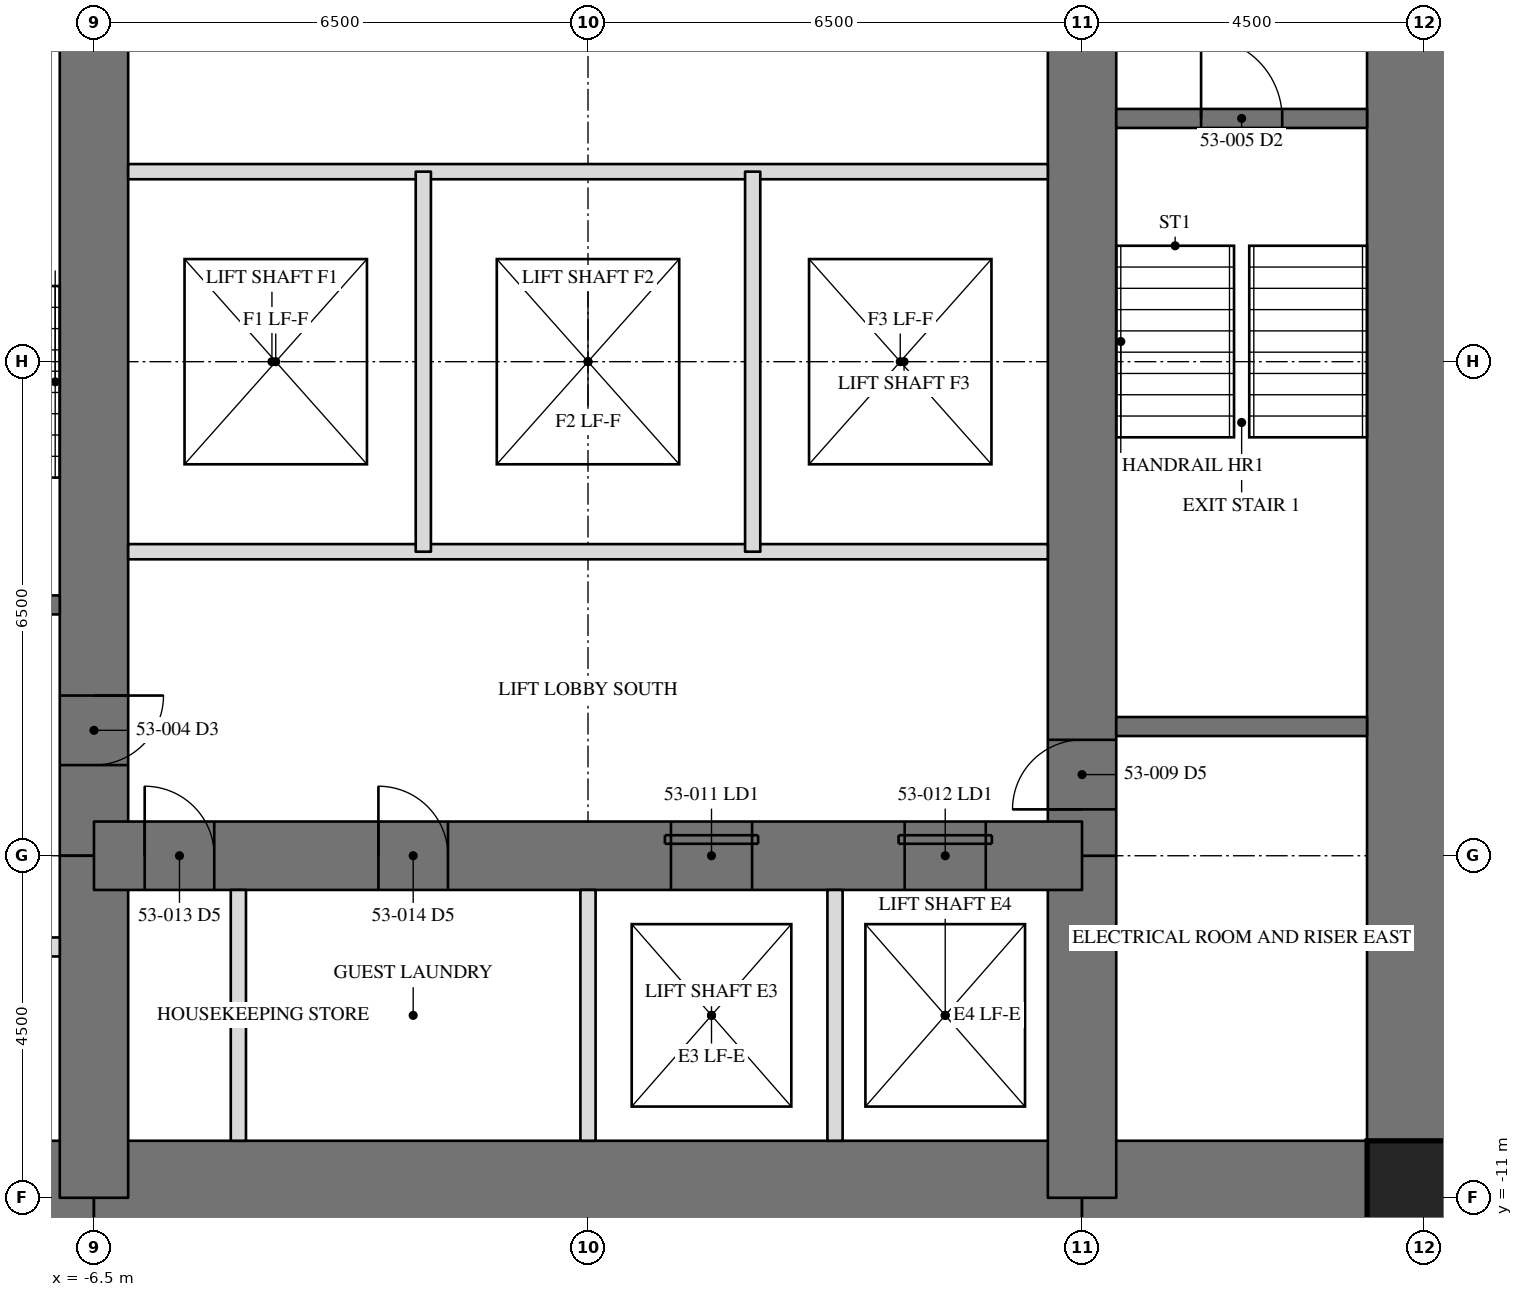
"""IFC4 building model, lengths in metres.
Left out: names, types, materials, properties, quantities, classifications, styles, units other than length and angle.
Written with IfcOpenShell. Run it as: python <this file> out.ifc"""

import sys

from ifc_helpers import new_model, si_unit, direction, frame, frame_2d, origin, origin_2d, place, context, subcontext, project, spatial, rectangle, hollow_rectangle, extrude, element, fill, save


model = new_model("IFC4")
c1 = context("Model", 3, precision=1e-05, world=origin(), true_north=direction((0.0, 1.0)))
c2 = subcontext(c1, "Body", "Model", "MODEL_VIEW")
j1 = project(units=[si_unit("LENGTHUNIT", "METRE"), si_unit("PLANEANGLEUNIT", "RADIAN")], contexts=[c1])
p1 = place(None, origin())
s1 = spatial("IfcSite", under=j1, at=p1, CompositionType="ELEMENT")
p2 = place(p1, origin())
s2 = spatial("IfcBuilding", under=s1, at=p2, CompositionType="ELEMENT")
p3 = place(p2, frame((0.0, 0.0, 222.2)))
s3 = spatial("IfcBuildingStorey", under=s2, at=p3, CompositionType="ELEMENT", Elevation=222.2)
p4 = place(p3, frame((11.0, -11.0, 0.0), z_axis=(0.0, 0.0, 1.0), x_axis=(0.0, 1.0, 0.0)))
e1 = element("IfcWall", 1, at=p4, inside=s3, PredefinedType="SHEAR", context=c2, shape_type="SweptSolid", body=[
    extrude(rectangle(XDim=22.0, YDim=1.5, at=frame_2d((11.0, 0.0))), origin(), (0.0, 0.0, 1.0), 3.5),
])
p5 = place(p4, frame((15.393, 0.0, 0.0)))
e2 = element("IfcOpeningElement", 2, at=p5, cuts=e1, PredefinedType="OPENING", context=c2, shape_type="SweptSolid", body=[
    extrude(rectangle(XDim=0.915, YDim=2.134, at=frame_2d((0.458, 1.067))), frame((0.0, 0.76, 0.0), z_axis=(0.0, -1.0, 0.0), x_axis=(1.0, 0.0, 0.0)), (0.0, 0.0, 1.0), 1.52),
])
p6 = place(p3, frame((-11.0, -11.0, 0.0), z_axis=(0.0, 0.0, 1.0), x_axis=(1.0, 0.0, 0.0)))
e3 = element("IfcWall", 3, at=p6, inside=s3, PredefinedType="SHEAR", context=c2, shape_type="SweptSolid", body=[
    extrude(rectangle(XDim=4.5, YDim=1.5, at=frame_2d((2.25, 0.0))), origin(), (0.0, 0.0, 1.0), 3.5),
])
p7 = place(p3, frame((-6.5, -11.0, 0.0), z_axis=(0.0, 0.0, 1.0), x_axis=(1.0, 0.0, 0.0)))
e4 = element("IfcWall", 4, at=p7, inside=s3, PredefinedType="SHEAR", context=c2, shape_type="SweptSolid", body=[
    extrude(rectangle(XDim=13.0, YDim=1.5, at=frame_2d((6.5, 0.0))), origin(), (0.0, 0.0, 1.0), 3.5),
])
p8 = place(p3, frame((6.5, -11.0, 0.0), z_axis=(0.0, 0.0, 1.0), x_axis=(1.0, 0.0, 0.0)))
e5 = element("IfcWall", 5, at=p8, inside=s3, PredefinedType="SHEAR", context=c2, shape_type="SweptSolid", body=[
    extrude(rectangle(XDim=4.5, YDim=1.5, at=frame_2d((2.25, 0.0))), origin(), (0.0, 0.0, 1.0), 3.5),
])
p9 = place(p3, frame((6.5, -11.0, 0.0), z_axis=(0.0, 0.0, 1.0), x_axis=(0.0, 1.0, 0.0)))
e6 = element("IfcWall", 6, at=p9, inside=s3, PredefinedType="SHEAR", context=c2, shape_type="SweptSolid", body=[
    extrude(rectangle(XDim=4.5, YDim=0.9, at=frame_2d((2.25, 0.0))), origin(), (0.0, 0.0, 1.0), 3.5),
])
p10 = place(p3, frame((6.5, -6.5, 0.0), z_axis=(0.0, 0.0, 1.0), x_axis=(0.0, 1.0, 0.0)))
e7 = element("IfcWall", 7, at=p10, inside=s3, PredefinedType="SHEAR", context=c2, shape_type="SweptSolid", body=[
    extrude(rectangle(XDim=13.0, YDim=0.9, at=frame_2d((6.5, 0.0))), origin(), (0.0, 0.0, 1.0), 3.5),
])
p11 = place(p10, frame((10.893, 0.0, 0.0)))
e8 = element("IfcOpeningElement", 8, at=p11, cuts=e7, PredefinedType="OPENING", context=c2, shape_type="SweptSolid", body=[
    extrude(rectangle(XDim=0.915, YDim=2.134, at=frame_2d((0.458, 1.067))), frame((0.0, 0.46, 0.0), z_axis=(0.0, -1.0, 0.0), x_axis=(1.0, 0.0, 0.0)), (0.0, 0.0, 1.0), 0.92),
])
p12 = place(p10, frame((0.61, 0.0, 0.0)))
e9 = element("IfcOpeningElement", 9, at=p12, cuts=e7, PredefinedType="OPENING", context=c2, shape_type="SweptSolid", body=[
    extrude(rectangle(XDim=0.915, YDim=2.134, at=frame_2d((0.458, 1.067))), frame((0.0, 0.46, 0.0), z_axis=(0.0, -1.0, 0.0), x_axis=(1.0, 0.0, 0.0)), (0.0, 0.0, 1.0), 0.92),
])
p13 = place(p3, frame((-6.5, 6.5, 0.0), z_axis=(0.0, 0.0, 1.0), x_axis=(0.0, -1.0, 0.0)))
e10 = element("IfcWall", 10, at=p13, inside=s3, PredefinedType="SHEAR", context=c2, shape_type="SweptSolid", body=[
    extrude(rectangle(XDim=13.0, YDim=0.9, at=frame_2d((6.5, 0.0))), origin(), (0.0, 0.0, 1.0), 3.5),
])
p14 = place(p13, frame((10.893, 0.0, 0.0)))
e11 = element("IfcOpeningElement", 11, at=p14, cuts=e10, PredefinedType="OPENING", context=c2, shape_type="SweptSolid", body=[
    extrude(rectangle(XDim=0.915, YDim=2.134, at=frame_2d((0.458, 1.067))), frame((0.0, 0.46, 0.0), z_axis=(0.0, -1.0, 0.0), x_axis=(1.0, 0.0, 0.0)), (0.0, 0.0, 1.0), 0.92),
])
p15 = place(p13, frame((0.61, 0.0, 0.0)))
e12 = element("IfcOpeningElement", 12, at=p15, cuts=e10, PredefinedType="OPENING", context=c2, shape_type="SweptSolid", body=[
    extrude(rectangle(XDim=0.915, YDim=2.134, at=frame_2d((0.458, 1.067))), frame((0.0, 0.46, 0.0), z_axis=(0.0, -1.0, 0.0), x_axis=(1.0, 0.0, 0.0)), (0.0, 0.0, 1.0), 0.92),
])
p16 = place(p3, frame((-6.5, -6.5, 0.0), z_axis=(0.0, 0.0, 1.0), x_axis=(0.0, -1.0, 0.0)))
e13 = element("IfcWall", 13, at=p16, inside=s3, PredefinedType="SHEAR", context=c2, shape_type="SweptSolid", body=[
    extrude(rectangle(XDim=4.5, YDim=0.9, at=frame_2d((2.25, 0.0))), origin(), (0.0, 0.0, 1.0), 3.5),
])
p17 = place(p3, frame((-6.5, -6.5, 0.0), z_axis=(0.0, 0.0, 1.0), x_axis=(1.0, 0.0, 0.0)))
e14 = element("IfcWall", 14, at=p17, inside=s3, PredefinedType="SHEAR", context=c2, shape_type="SweptSolid", body=[
    extrude(rectangle(XDim=13.0, YDim=0.9, at=frame_2d((6.5, 0.0))), origin(), (0.0, 0.0, 1.0), 3.5),
])
p18 = place(p17, frame((7.592, 0.0, 0.0)))
e15 = element("IfcOpeningElement", 15, at=p18, cuts=e14, PredefinedType="OPENING", context=c2, shape_type="SweptSolid", body=[
    extrude(rectangle(XDim=1.067, YDim=2.134, at=frame_2d((0.533, 1.067))), frame((0.0, 0.46, 0.0), z_axis=(0.0, -1.0, 0.0), x_axis=(1.0, 0.0, 0.0)), (0.0, 0.0, 1.0), 0.92),
])
p19 = place(p17, frame((10.667, 0.0, 0.0)))
e16 = element("IfcOpeningElement", 16, at=p19, cuts=e14, PredefinedType="OPENING", context=c2, shape_type="SweptSolid", body=[
    extrude(rectangle(XDim=1.067, YDim=2.134, at=frame_2d((0.533, 1.067))), frame((0.0, 0.46, 0.0), z_axis=(0.0, -1.0, 0.0), x_axis=(1.0, 0.0, 0.0)), (0.0, 0.0, 1.0), 0.92),
])
p20 = place(p17, frame((0.667, 0.0, 0.0)))
e17 = element("IfcOpeningElement", 17, at=p20, cuts=e14, PredefinedType="OPENING", context=c2, shape_type="SweptSolid", body=[
    extrude(rectangle(XDim=0.915, YDim=2.134, at=frame_2d((0.458, 1.067))), frame((0.0, 0.46, 0.0), z_axis=(0.0, -1.0, 0.0), x_axis=(1.0, 0.0, 0.0)), (0.0, 0.0, 1.0), 0.92),
])
p21 = place(p17, frame((3.742, 0.0, 0.0)))
e18 = element("IfcOpeningElement", 18, at=p21, cuts=e14, PredefinedType="OPENING", context=c2, shape_type="SweptSolid", body=[
    extrude(rectangle(XDim=0.915, YDim=2.134, at=frame_2d((0.458, 1.067))), frame((0.0, 0.46, 0.0), z_axis=(0.0, -1.0, 0.0), x_axis=(1.0, 0.0, 0.0)), (0.0, 0.0, 1.0), 0.92),
])
p22 = place(p3, frame((11.0, -11.0, 0.0), z_axis=(0.0, 0.0, 1.0), x_axis=(1.0, 0.0, 0.0)))
e19 = element("IfcColumn", 19, at=p22, inside=s3, PredefinedType="COLUMN", context=c2, shape_type="SweptSolid", body=[
    extrude(hollow_rectangle(XDim=1.499, YDim=1.499, WallThickness=0.102, at=origin_2d()), origin(), (0.0, 0.0, 1.0), 3.5),
])
p23 = place(p3, frame((6.95, -4.8, 0.0), z_axis=(0.0, 0.0, 1.0), x_axis=(1.0, 0.0, 0.0)))
e20 = element("IfcWall", 20, at=p23, inside=s3, PredefinedType="SOLIDWALL", context=c2, shape_type="SweptSolid", body=[
    extrude(rectangle(XDim=3.3, YDim=0.25, at=frame_2d((1.65, 0.0))), origin(), (0.0, 0.0, 1.0), 3.31),
])
p24 = place(p3, frame((6.95, 3.2, 0.0), z_axis=(0.0, 0.0, 1.0), x_axis=(1.0, 0.0, 0.0)))
e21 = element("IfcWall", 21, at=p24, inside=s3, PredefinedType="SOLIDWALL", context=c2, shape_type="SweptSolid", body=[
    extrude(rectangle(XDim=3.3, YDim=0.25, at=frame_2d((1.65, 0.0))), origin(), (0.0, 0.0, 1.0), 3.31),
])
p25 = place(p24, frame((1.116, 0.0, 0.0)))
e22 = element("IfcOpeningElement", 22, at=p25, cuts=e21, PredefinedType="OPENING", context=c2, shape_type="SweptSolid", body=[
    extrude(rectangle(XDim=1.067, YDim=2.134, at=frame_2d((0.533, 1.067))), frame((0.0, 0.135, 0.0), z_axis=(0.0, -1.0, 0.0), x_axis=(1.0, 0.0, 0.0)), (0.0, 0.0, 1.0), 0.27),
])
p26 = place(p3, frame((-6.95, -3.2, 0.0), z_axis=(0.0, 0.0, 1.0), x_axis=(-1.0, 0.0, 0.0)))
e23 = element("IfcWall", 23, at=p26, inside=s3, PredefinedType="SOLIDWALL", context=c2, shape_type="SweptSolid", body=[
    extrude(rectangle(XDim=3.3, YDim=0.25, at=frame_2d((1.65, 0.0))), origin(), (0.0, 0.0, 1.0), 3.31),
])
p27 = place(p26, frame((1.116, 0.0, 0.0)))
e24 = element("IfcOpeningElement", 24, at=p27, cuts=e23, PredefinedType="OPENING", context=c2, shape_type="SweptSolid", body=[
    extrude(rectangle(XDim=1.067, YDim=2.134, at=frame_2d((0.533, 1.067))), frame((0.0, 0.135, 0.0), z_axis=(0.0, -1.0, 0.0), x_axis=(1.0, 0.0, 0.0)), (0.0, 0.0, 1.0), 0.27),
])
p28 = place(p3, frame((-6.95, -7.7, 0.0), z_axis=(0.0, 0.0, 1.0), x_axis=(-1.0, 0.0, 0.0)))
e25 = element("IfcWall", 25, at=p28, inside=s3, PredefinedType="PARTITIONING", context=c2, shape_type="SweptSolid", body=[
    extrude(rectangle(XDim=3.3, YDim=0.25, at=frame_2d((1.65, 0.0))), origin(), (0.0, 0.0, 1.0), 3.31),
])
p29 = place(p28, frame((0.45, 0.0, 0.0)))
e26 = element("IfcOpeningElement", 26, at=p29, cuts=e25, PredefinedType="OPENING", context=c2, shape_type="SweptSolid", body=[
    extrude(rectangle(XDim=1.219, YDim=2.134, at=frame_2d((0.609, 1.067))), frame((0.0, 0.135, 0.0), z_axis=(0.0, -1.0, 0.0), x_axis=(1.0, 0.0, 0.0)), (0.0, 0.0, 1.0), 0.27),
])
for number, where, z_axis, x_axis in (
    (27, (-6.05, 2.5, 0.0), (0.0, 0.0, 1.0), (1.0, 0.0, 0.0)),
    (28, (6.05, -2.5, 0.0), (0.0, 0.0, 1.0), (-1.0, 0.0, 0.0)),
):
    element("IfcWall", number, at=place(p3, frame(where, z_axis=z_axis, x_axis=x_axis)), inside=s3, PredefinedType="PARTITIONING", context=c2, shape_type="SweptSolid", body=[
        extrude(rectangle(XDim=12.1, YDim=0.2, at=frame_2d((6.05, 0.0))), origin(), (0.0, 0.0, 1.0), 3.31),
    ])
for number, where, z_axis, x_axis in (
    (29, (0.0, -10.25, 0.0), (0.0, 0.0, 1.0), (0.0, 1.0, 0.0)),
    (30, (3.25, -10.25, 0.0), (0.0, 0.0, 1.0), (0.0, 1.0, 0.0)),
):
    element("IfcWall", number, at=place(p3, frame(where, z_axis=z_axis, x_axis=x_axis)), inside=s3, PredefinedType="PARTITIONING", context=c2, shape_type="SweptSolid", body=[
        extrude(rectangle(XDim=3.3, YDim=0.2, at=frame_2d((1.65, 0.0))), origin(), (0.0, 0.0, 1.0), 3.31),
    ])
for number, where, z_axis, x_axis in (
    (31, (-2.167, -2.5, 0.0), (0.0, 0.0, 1.0), (0.0, 1.0, 0.0)),
    (32, (2.167, -2.5, 0.0), (0.0, 0.0, 1.0), (0.0, 1.0, 0.0)),
):
    element("IfcWall", number, at=place(p3, frame(where, z_axis=z_axis, x_axis=x_axis)), inside=s3, PredefinedType="PARTITIONING", context=c2, shape_type="SweptSolid", body=[
        extrude(rectangle(XDim=5.0, YDim=0.2, at=frame_2d((2.5, 0.0))), origin(), (0.0, 0.0, 1.0), 3.31),
    ])
p30 = place(p3, frame((-4.6, -10.25, 0.0), z_axis=(0.0, 0.0, 1.0), x_axis=(0.0, 1.0, 0.0)))
e33 = element("IfcWall", 33, at=p30, inside=s3, PredefinedType="PARTITIONING", context=c2, shape_type="SweptSolid", body=[
    extrude(rectangle(XDim=3.3, YDim=0.2, at=frame_2d((1.65, 0.0))), origin(), (0.0, 0.0, 1.0), 3.31),
])
p31 = place(p14, origin())
e34 = element("IfcDoor", 34, at=p31, inside=s3, OperationType="SINGLE_SWING_RIGHT", PredefinedType="DOOR", context=c2, shape_type="SweptSolid", body=[
    extrude(rectangle(XDim=0.915, YDim=2.134, at=frame_2d((0.458, 1.067))), frame((0.0, -0.375, 0.0), z_axis=(0.0, -1.0, 0.0), x_axis=(1.0, 0.0, 0.0)), (0.0, 0.0, 1.0), 0.05),
])
fill(e11, e34)
p32 = place(p25, origin())
e35 = element("IfcDoor", 35, at=p32, inside=s3, OperationType="SINGLE_SWING_LEFT", PredefinedType="DOOR", context=c2, shape_type="SweptSolid", body=[
    extrude(rectangle(XDim=1.067, YDim=2.134, at=frame_2d((0.533, 1.067))), frame((0.0, 0.025, 0.0), z_axis=(0.0, -1.0, 0.0), x_axis=(1.0, 0.0, 0.0)), (0.0, 0.0, 1.0), 0.05),
])
fill(e22, e35)
p33 = place(p12, origin())
e36 = element("IfcDoor", 36, at=p33, inside=s3, OperationType="SINGLE_SWING_RIGHT", PredefinedType="DOOR", context=c2, shape_type="SweptSolid", body=[
    extrude(rectangle(XDim=0.915, YDim=2.134, at=frame_2d((0.458, 1.067))), frame((0.0, -0.375, 0.0), z_axis=(0.0, -1.0, 0.0), x_axis=(1.0, 0.0, 0.0)), (0.0, 0.0, 1.0), 0.05),
])
fill(e9, e36)
p34 = place(p18, origin())
e37 = element("IfcDoor", 37, at=p34, inside=s3, OperationType="SLIDING_TO_LEFT", PredefinedType="DOOR", context=c2, shape_type="SweptSolid", body=[
    extrude(rectangle(XDim=1.067, YDim=2.134, at=frame_2d((0.533, 1.067))), frame((0.0, -0.375, 0.0), z_axis=(0.0, -1.0, 0.0), x_axis=(1.0, 0.0, 0.0)), (0.0, 0.0, 1.0), 0.05),
])
fill(e15, e37)
p35 = place(p19, origin())
e38 = element("IfcDoor", 38, at=p35, inside=s3, OperationType="SLIDING_TO_LEFT", PredefinedType="DOOR", context=c2, shape_type="SweptSolid", body=[
    extrude(rectangle(XDim=1.067, YDim=2.134, at=frame_2d((0.533, 1.067))), frame((0.0, -0.375, 0.0), z_axis=(0.0, -1.0, 0.0), x_axis=(1.0, 0.0, 0.0)), (0.0, 0.0, 1.0), 0.05),
])
fill(e16, e38)
p36 = place(p20, origin())
e39 = element("IfcDoor", 39, at=p36, inside=s3, OperationType="SINGLE_SWING_RIGHT", PredefinedType="DOOR", context=c2, shape_type="SweptSolid", body=[
    extrude(rectangle(XDim=0.915, YDim=2.134, at=frame_2d((0.458, 1.067))), frame((0.0, -0.375, 0.0), z_axis=(0.0, -1.0, 0.0), x_axis=(1.0, 0.0, 0.0)), (0.0, 0.0, 1.0), 0.05),
])
fill(e17, e39)
p37 = place(p21, origin())
e40 = element("IfcDoor", 40, at=p37, inside=s3, OperationType="SINGLE_SWING_RIGHT", PredefinedType="DOOR", context=c2, shape_type="SweptSolid", body=[
    extrude(rectangle(XDim=0.915, YDim=2.134, at=frame_2d((0.458, 1.067))), frame((0.0, -0.375, 0.0), z_axis=(0.0, -1.0, 0.0), x_axis=(1.0, 0.0, 0.0)), (0.0, 0.0, 1.0), 0.05),
])
fill(e18, e40)
save(model, sys.argv[1])
